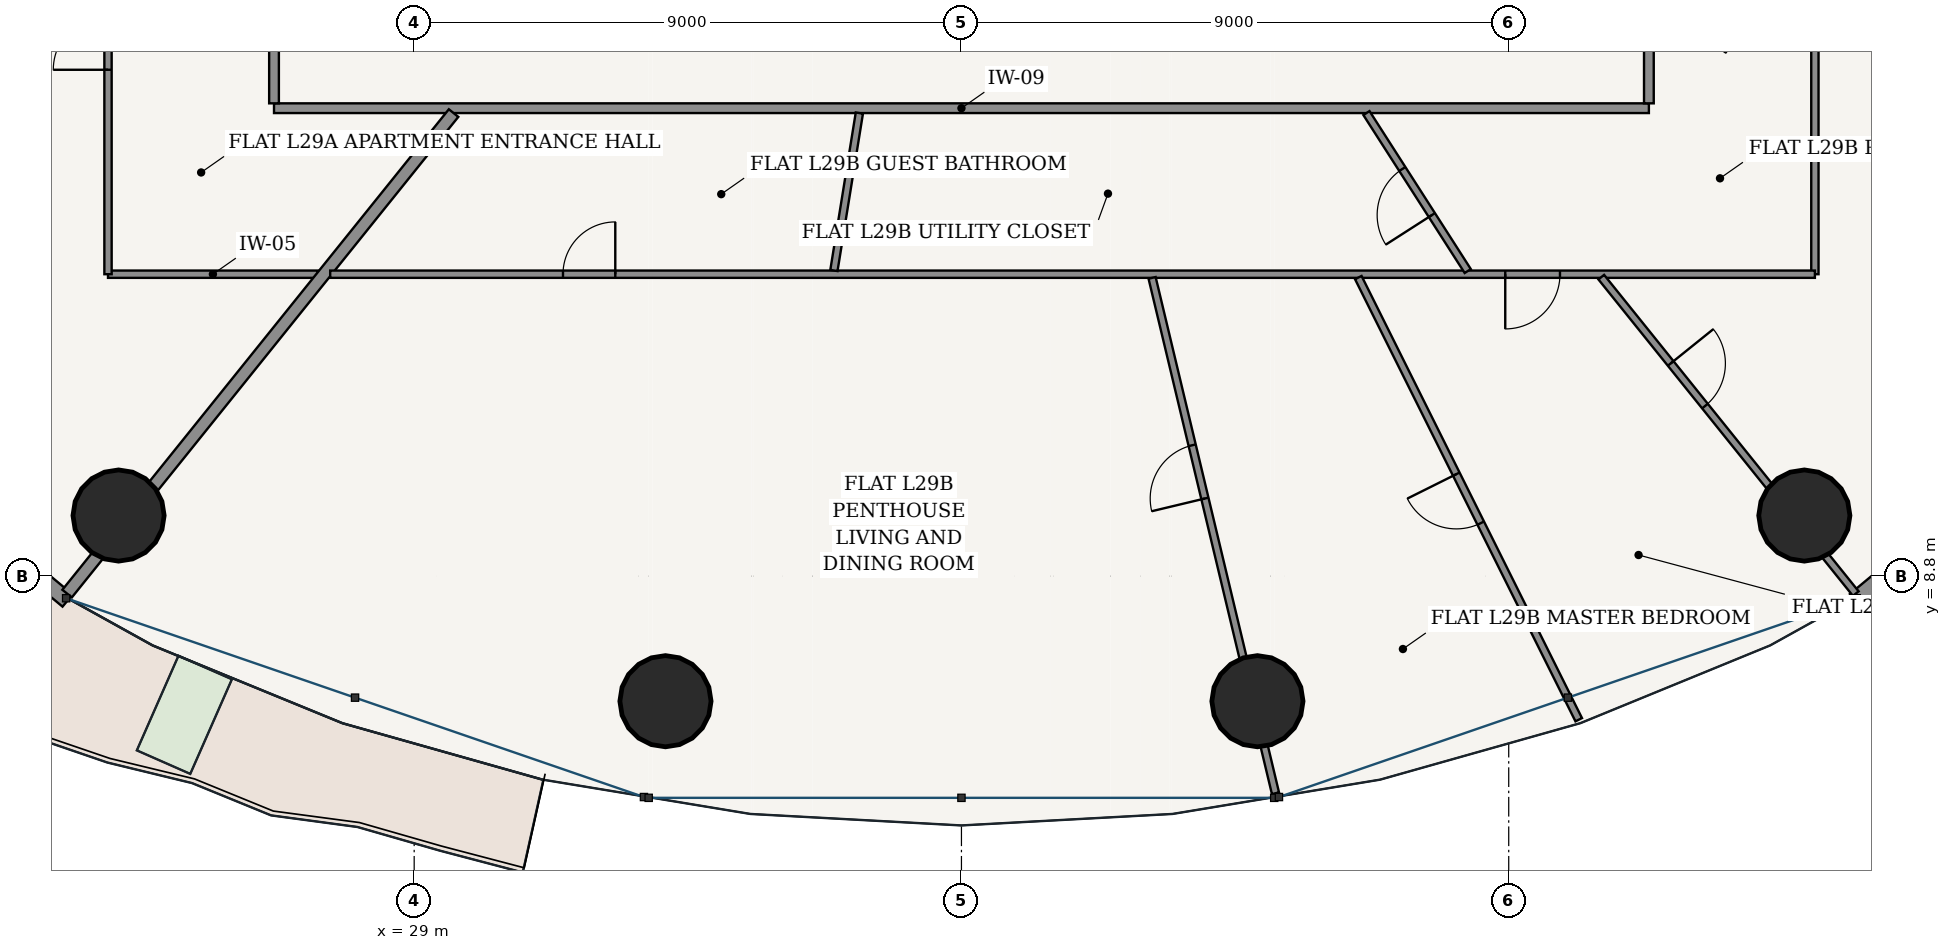
"""IFC4 building model, lengths in metres.
Left out: names, types, materials, properties, quantities, classifications, styles, units other than length and angle.
Written with IfcOpenShell. Run it as: python <this file> out.ifc"""

import sys

from ifc_helpers import new_model, si_unit, direction, frame, frame_2d, origin, origin_2d, place, context, subcontext, project, spatial, rectangle, hollow_circle, extrude, source, transform, mapped, element, fill, save


model = new_model("IFC4")
c1 = context("Model", 3, precision=1e-05, world=origin(), true_north=direction((-0.2419218956, 0.970295726276)))
c2 = subcontext(c1, "Body", "Model", "MODEL_VIEW")
j1 = project(units=[si_unit("LENGTHUNIT", "METRE"), si_unit("PLANEANGLEUNIT", "RADIAN")], contexts=[c1])
p1 = place(None, origin())
s1 = spatial("IfcSite", under=j1, at=p1, CompositionType="ELEMENT")
p2 = place(p1, origin())
s2 = spatial("IfcBuilding", under=s1, at=p2, CompositionType="ELEMENT")
p3 = place(p2, frame((0.0, 0.0, 112.2)))
s3 = spatial("IfcBuildingStorey", under=s2, at=p3, CompositionType="ELEMENT", Elevation=112.2)
for number, where, z_axis, x_axis in (
    (1, (24.138, 9.796, 0.0), (0.0, 0.0, 1.0), (1.0, 0.0, 0.0)),
    (2, (33.133, 6.743, 0.0), (0.0, 0.0, 1.0), (1.0, 0.0, 0.0)),
    (3, (42.867, 6.743, 0.0), (0.0, 0.0, 1.0), (1.0, 0.0, 0.0)),
    (4, (51.862, 9.796, 0.0), (0.0, 0.0, 1.0), (1.0, 0.0, 0.0)),
):
    element("IfcColumn", number, at=place(p3, frame(where, z_axis=z_axis, x_axis=x_axis)), inside=s3, PredefinedType="COLUMN", context=c2, shape_type="SweptSolid", body=[
        extrude(hollow_circle(Radius=0.75, WallThickness=0.045, at=origin_2d()), origin(), (0.0, 0.0, 1.0), 3.6),
    ])
p4 = place(p3, frame((15.846, 14.59, 0.0), z_axis=(0.0, 0.0, 1.0), x_axis=(0.769254958887, -0.638941944333, 0.0)))
e5 = element("IfcWall", 5, at=p4, inside=s3, PredefinedType="SOLIDWALL", context=c2, shape_type="SweptSolid", body=[
    extrude(rectangle(XDim=9.69, YDim=0.26, at=frame_2d((4.845, 0.0))), origin(), (0.0, 0.0, 1.0), 3.325),
])
p5 = place(p4, frame((4.17, 0.0, 0.0)))
e6 = element("IfcOpeningElement", 6, at=p5, cuts=e5, PredefinedType="OPENING", context=c2, shape_type="SweptSolid", body=[
    extrude(rectangle(XDim=1.35, YDim=2.2, at=frame_2d((0.675, 1.1))), frame((0.0, 0.14, 0.0), z_axis=(0.0, -1.0, 0.0), x_axis=(1.0, 0.0, 0.0)), (0.0, 0.0, 1.0), 0.28),
])
p6 = place(p3, frame((52.7, 8.398, 0.0), z_axis=(0.0, 0.0, 1.0), x_axis=(0.769254958887, 0.638941944333, 0.0)))
e7 = element("IfcWall", 7, at=p6, inside=s3, PredefinedType="SOLIDWALL", context=c2, shape_type="SweptSolid", body=[
    extrude(rectangle(XDim=9.69, YDim=0.28, at=frame_2d((4.845, 0.0))), origin(), (0.0, 0.0, 1.0), 3.325),
])
p7 = place(p6, frame((1.566, 0.0, 0.85)))
e8 = element("IfcOpeningElement", 8, at=p7, cuts=e7, PredefinedType="OPENING", context=c2, shape_type="SweptSolid", body=[
    extrude(rectangle(XDim=2.1, YDim=1.95, at=frame_2d((1.05, 0.975))), frame((0.0, 0.15, 0.0), z_axis=(0.0, -1.0, 0.0), x_axis=(1.0, 0.0, 0.0)), (0.0, 0.0, 1.0), 0.3),
])
p8 = place(p6, frame((6.023, 0.0, 0.85)))
e9 = element("IfcOpeningElement", 9, at=p8, cuts=e7, PredefinedType="OPENING", context=c2, shape_type="SweptSolid", body=[
    extrude(rectangle(XDim=2.1, YDim=1.95, at=frame_2d((1.05, 0.975))), frame((0.0, 0.15, 0.0), z_axis=(0.0, -1.0, 0.0), x_axis=(1.0, 0.0, 0.0)), (0.0, 0.0, 1.0), 0.3),
])
p9 = place(p3, frame((26.695, 16.495, 0.0), z_axis=(0.0, 0.0, 1.0), x_axis=(1.0, 0.0, 0.0)))
e10 = element("IfcWall", 10, at=p9, inside=s3, PredefinedType="PARTITIONING", context=c2, shape_type="SweptSolid", body=[
    extrude(rectangle(XDim=22.61, YDim=0.16, at=frame_2d((11.305, 0.0))), origin(), (0.0, 0.0, 1.0), 2.767),
])
p10 = place(p3, frame((26.695, 16.575, 0.0), z_axis=(0.0, 0.0, 1.0), x_axis=(0.0, 1.0, 0.0)))
e11 = element("IfcWall", 11, at=p10, inside=s3, PredefinedType="PARTITIONING", context=c2, shape_type="SweptSolid", body=[
    extrude(rectangle(XDim=20.45, YDim=0.16, at=frame_2d((10.225, 0.0))), origin(), (0.0, 0.0, 1.0), 2.767),
])
p11 = place(p10, frame((2.424, 0.0, 0.0)))
e12 = element("IfcOpeningElement", 12, at=p11, cuts=e11, PredefinedType="OPENING", context=c2, shape_type="SweptSolid", body=[
    extrude(rectangle(XDim=0.98, YDim=2.2, at=frame_2d((0.49, 1.1))), frame((0.0, 0.09, 0.0), z_axis=(0.0, -1.0, 0.0), x_axis=(1.0, 0.0, 0.0)), (0.0, 0.0, 1.0), 0.18),
])
p12 = place(p3, frame((49.305, 16.575, 0.0), z_axis=(0.0, 0.0, 1.0), x_axis=(0.0, 1.0, 0.0)))
e13 = element("IfcWall", 13, at=p12, inside=s3, PredefinedType="PARTITIONING", context=c2, shape_type="SweptSolid", body=[
    extrude(rectangle(XDim=20.45, YDim=0.16, at=frame_2d((10.225, 0.0))), origin(), (0.0, 0.0, 1.0), 2.767),
])
p13 = place(p12, frame((17.046, 0.0, 0.0)))
e14 = element("IfcOpeningElement", 14, at=p13, cuts=e13, PredefinedType="OPENING", context=c2, shape_type="SweptSolid", body=[
    extrude(rectangle(XDim=0.98, YDim=2.2, at=frame_2d((0.49, 1.1))), frame((0.0, 0.09, 0.0), z_axis=(0.0, -1.0, 0.0), x_axis=(1.0, 0.0, 0.0)), (0.0, 0.0, 1.0), 0.18),
])
p14 = place(p3, frame((27.415, 13.765, 0.0), z_axis=(0.0, 0.0, 1.0), x_axis=(-1.0, 0.0, 0.0)))
e15 = element("IfcWall", 15, at=p14, inside=s3, PredefinedType="PARTITIONING", context=c2, shape_type="SweptSolid", body=[
    extrude(rectangle(XDim=3.45, YDim=0.12, at=frame_2d((1.725, 0.0))), origin(), (0.0, 0.0, 1.0), 2.767),
])
p15 = place(p3, frame((23.965, 13.765, 0.0), z_axis=(0.0, 0.0, 1.0), x_axis=(0.0, 1.0, 0.0)))
e16 = element("IfcWall", 16, at=p15, inside=s3, PredefinedType="PARTITIONING", context=c2, shape_type="SweptSolid", body=[
    extrude(rectangle(XDim=26.07, YDim=0.12, at=frame_2d((13.035, 0.0))), origin(), (0.0, 0.0, 1.0), 2.767),
])
p16 = place(p15, frame((3.362, 0.0, 0.0)))
e17 = element("IfcOpeningElement", 17, at=p16, cuts=e16, PredefinedType="OPENING", context=c2, shape_type="SweptSolid", body=[
    extrude(rectangle(XDim=0.9, YDim=2.15, at=frame_2d((0.45, 1.075))), frame((0.0, 0.07, 0.0), z_axis=(0.0, -1.0, 0.0), x_axis=(1.0, 0.0, 0.0)), (0.0, 0.0, 1.0), 0.14),
])
p17 = place(p15, frame((13.924, 0.0, 0.0)))
e18 = element("IfcOpeningElement", 18, at=p17, cuts=e16, PredefinedType="OPENING", context=c2, shape_type="SweptSolid", body=[
    extrude(rectangle(XDim=0.9, YDim=2.15, at=frame_2d((0.45, 1.075))), frame((0.0, 0.07, 0.0), z_axis=(0.0, -1.0, 0.0), x_axis=(1.0, 0.0, 0.0)), (0.0, 0.0, 1.0), 0.14),
])
p18 = place(p3, frame((29.648, 16.415, 0.0), z_axis=(0.0, 0.0, 1.0), x_axis=(-0.626701127389, -0.779259710834, 0.0)))
e19 = element("IfcWall", 19, at=p18, inside=s3, PredefinedType="PARTITIONING", context=c2, shape_type="SweptSolid", body=[
    extrude(rectangle(XDim=10.141, YDim=0.2, at=frame_2d((5.071, 0.0))), origin(), (0.0, 0.0, 1.0), 2.767),
])
p19 = place(p3, frame((52.035, 39.835, 0.0), z_axis=(0.0, 0.0, 1.0), x_axis=(0.0, -1.0, 0.0)))
e20 = element("IfcWall", 20, at=p19, inside=s3, PredefinedType="PARTITIONING", context=c2, shape_type="SweptSolid", body=[
    extrude(rectangle(XDim=26.07, YDim=0.12, at=frame_2d((13.035, 0.0))), origin(), (0.0, 0.0, 1.0), 2.767),
])
p20 = place(p19, frame((3.362, 0.0, 0.0)))
e21 = element("IfcOpeningElement", 21, at=p20, cuts=e20, PredefinedType="OPENING", context=c2, shape_type="SweptSolid", body=[
    extrude(rectangle(XDim=0.9, YDim=2.15, at=frame_2d((0.45, 1.075))), frame((0.0, 0.07, 0.0), z_axis=(0.0, -1.0, 0.0), x_axis=(1.0, 0.0, 0.0)), (0.0, 0.0, 1.0), 0.14),
])
p21 = place(p19, frame((13.924, 0.0, 0.0)))
e22 = element("IfcOpeningElement", 22, at=p21, cuts=e20, PredefinedType="OPENING", context=c2, shape_type="SweptSolid", body=[
    extrude(rectangle(XDim=0.9, YDim=2.15, at=frame_2d((0.45, 1.075))), frame((0.0, 0.07, 0.0), z_axis=(0.0, -1.0, 0.0), x_axis=(1.0, 0.0, 0.0)), (0.0, 0.0, 1.0), 0.14),
])
p22 = place(p3, frame((52.035, 13.765, 0.0), z_axis=(0.0, 0.0, 1.0), x_axis=(-1.0, 0.0, 0.0)))
e23 = element("IfcWall", 23, at=p22, inside=s3, PredefinedType="PARTITIONING", context=c2, shape_type="SweptSolid", body=[
    extrude(rectangle(XDim=24.416, YDim=0.12, at=frame_2d((12.208, 0.0))), origin(), (0.0, 0.0, 1.0), 2.767),
])
p23 = place(p22, frame((4.192, 0.0, 0.0)))
e24 = element("IfcOpeningElement", 24, at=p23, cuts=e23, PredefinedType="OPENING", context=c2, shape_type="SweptSolid", body=[
    extrude(rectangle(XDim=0.9, YDim=2.15, at=frame_2d((0.45, 1.075))), frame((0.0, 0.07, 0.0), z_axis=(0.0, -1.0, 0.0), x_axis=(1.0, 0.0, 0.0)), (0.0, 0.0, 1.0), 0.14),
])
p24 = place(p22, frame((19.728, 0.0, 0.0)))
e25 = element("IfcOpeningElement", 25, at=p24, cuts=e23, PredefinedType="OPENING", context=c2, shape_type="SweptSolid", body=[
    extrude(rectangle(XDim=0.86, YDim=2.15, at=frame_2d((0.43, 1.075))), frame((0.0, 0.07, 0.0), z_axis=(0.0, -1.0, 0.0), x_axis=(1.0, 0.0, 0.0)), (0.0, 0.0, 1.0), 0.14),
])
p25 = place(p3, frame((41.135, 13.705, 0.0), z_axis=(0.0, 0.0, 1.0), x_axis=(0.23282725047, -0.97251810854, 0.0)))
e26 = element("IfcWall", 26, at=p25, inside=s3, PredefinedType="PARTITIONING", context=c2, shape_type="SweptSolid", body=[
    extrude(rectangle(XDim=8.715, YDim=0.12, at=frame_2d((4.357, 0.0))), origin(), (0.0, 0.0, 1.0), 2.767),
])
p26 = place(p25, frame((2.831, 0.0, 0.0)))
e27 = element("IfcOpeningElement", 27, at=p26, cuts=e26, PredefinedType="OPENING", context=c2, shape_type="SweptSolid", body=[
    extrude(rectangle(XDim=0.9, YDim=2.15, at=frame_2d((0.45, 1.075))), frame((0.0, 0.07, 0.0), z_axis=(0.0, -1.0, 0.0), x_axis=(1.0, 0.0, 0.0)), (0.0, 0.0, 1.0), 0.14),
])
p27 = place(p3, frame((44.526, 13.709, 0.0), z_axis=(0.0, 0.0, 1.0), x_axis=(0.446179583353, -0.894943450392, 0.0)))
e28 = element("IfcWall", 28, at=p27, inside=s3, PredefinedType="PARTITIONING", context=c2, shape_type="SweptSolid", body=[
    extrude(rectangle(XDim=8.125, YDim=0.12, at=frame_2d((4.062, 0.0))), origin(), (0.0, 0.0, 1.0), 2.767),
])
p28 = place(p27, frame((3.612, 0.0, 0.0)))
e29 = element("IfcOpeningElement", 29, at=p28, cuts=e28, PredefinedType="OPENING", context=c2, shape_type="SweptSolid", body=[
    extrude(rectangle(XDim=0.9, YDim=2.15, at=frame_2d((0.45, 1.075))), frame((0.0, 0.07, 0.0), z_axis=(0.0, -1.0, 0.0), x_axis=(1.0, 0.0, 0.0)), (0.0, 0.0, 1.0), 0.14),
])
p29 = place(p3, frame((48.522, 13.717, 0.0), z_axis=(0.0, 0.0, 1.0), x_axis=(0.626707979732, -0.77925419995, 0.0)))
e30 = element("IfcWall", 30, at=p29, inside=s3, PredefinedType="PARTITIONING", context=c2, shape_type="SweptSolid", body=[
    extrude(rectangle(XDim=6.679, YDim=0.12, at=frame_2d((3.339, 0.0))), origin(), (0.0, 0.0, 1.0), 2.767),
])
p30 = place(p29, frame((1.821, 0.0, 0.0)))
e31 = element("IfcOpeningElement", 31, at=p30, cuts=e30, PredefinedType="OPENING", context=c2, shape_type="SweptSolid", body=[
    extrude(rectangle(XDim=0.9, YDim=2.15, at=frame_2d((0.45, 1.075))), frame((0.0, 0.07, 0.0), z_axis=(0.0, -1.0, 0.0), x_axis=(1.0, 0.0, 0.0)), (0.0, 0.0, 1.0), 0.14),
])
p31 = place(p3, frame((52.089, 18.979, 0.0), z_axis=(0.0, 0.0, 1.0), x_axis=(0.874313476423, -0.485361664066, 0.0)))
e32 = element("IfcWall", 32, at=p31, inside=s3, PredefinedType="PARTITIONING", context=c2, shape_type="SweptSolid", body=[
    extrude(rectangle(XDim=9.066, YDim=0.12, at=frame_2d((4.533, 0.0))), origin(), (0.0, 0.0, 1.0), 2.767),
])
p32 = place(p3, frame((36.321, 16.415, 0.0), z_axis=(0.0, 0.0, 1.0), x_axis=(-0.159566101486, -0.9871872463, 0.0)))
e33 = element("IfcWall", 33, at=p32, inside=s3, PredefinedType="PARTITIONING", context=c2, shape_type="SweptSolid", body=[
    extrude(rectangle(XDim=2.623, YDim=0.12, at=frame_2d((1.311, 0.0))), origin(), (0.0, 0.0, 1.0), 3.325),
])
p33 = place(p3, frame((44.66, 16.415, 0.0), z_axis=(0.0, 0.0, 1.0), x_axis=(0.539825682796, -0.841776830397, 0.0)))
e34 = element("IfcWall", 34, at=p33, inside=s3, PredefinedType="PARTITIONING", context=c2, shape_type="SweptSolid", body=[
    extrude(rectangle(XDim=3.086, YDim=0.12, at=frame_2d((1.543, 0.0))), origin(), (0.0, 0.0, 1.0), 3.325),
])
p34 = place(p33, frame((1.093, 0.0, 0.0)))
e35 = element("IfcOpeningElement", 35, at=p34, cuts=e34, PredefinedType="OPENING", context=c2, shape_type="SweptSolid", body=[
    extrude(rectangle(XDim=0.9, YDim=2.15, at=frame_2d((0.45, 1.075))), frame((0.0, 0.07, 0.0), z_axis=(0.0, -1.0, 0.0), x_axis=(1.0, 0.0, 0.0)), (0.0, 0.0, 1.0), 0.14),
])
m1 = source(origin(), c2, "Body", "SweptSolid", [
    extrude(rectangle(XDim=0.9, YDim=2.15, at=frame_2d((0.45, 1.075))), frame((0.0, 0.025, 0.0), z_axis=(0.0, -1.0, 0.0), x_axis=(1.0, 0.0, 0.0)), (0.0, 0.0, 1.0), 0.05),
])
p35 = place(p16, origin())
e36 = element("IfcDoor", 36, at=p35, inside=s3, OperationType="SINGLE_SWING_LEFT", PredefinedType="DOOR", context=c2, shape_type="MappedRepresentation", body=[
    mapped(m1, transform((0.0, 0.0, 0.0), scale=1.0)),
])
fill(e17, e36)
p36 = place(p23, origin())
e37 = element("IfcDoor", 37, at=p36, inside=s3, OperationType="SINGLE_SWING_RIGHT", PredefinedType="DOOR", context=c2, shape_type="MappedRepresentation", body=[
    mapped(m1, transform((0.0, 0.0, 0.0), scale=1.0)),
])
fill(e24, e37)
p37 = place(p30, origin())
e38 = element("IfcDoor", 38, at=p37, inside=s3, OperationType="SINGLE_SWING_LEFT", PredefinedType="DOOR", context=c2, shape_type="MappedRepresentation", body=[
    mapped(m1, transform((0.0, 0.0, 0.0), scale=1.0)),
])
fill(e31, e38)
p38 = place(p34, frame((0.9, 0.0, 0.0), z_axis=(0.0, 0.0, 1.0), x_axis=(-1.0, 0.0, 0.0)))
e39 = element("IfcDoor", 39, at=p38, inside=s3, OperationType="SINGLE_SWING_LEFT", PredefinedType="DOOR", context=c2, shape_type="MappedRepresentation", body=[
    mapped(m1, transform((0.0, 0.0, 0.0), scale=1.0)),
])
fill(e35, e39)
p39 = place(p28, frame((0.9, 0.0, 0.0), z_axis=(0.0, 0.0, 1.0), x_axis=(-1.0, 0.0, 0.0)))
e40 = element("IfcDoor", 40, at=p39, inside=s3, OperationType="SINGLE_SWING_RIGHT", PredefinedType="DOOR", context=c2, shape_type="MappedRepresentation", body=[
    mapped(m1, transform((0.0, 0.0, 0.0), scale=1.0)),
])
fill(e29, e40)
p40 = place(p26, frame((0.9, 0.0, 0.0), z_axis=(0.0, 0.0, 1.0), x_axis=(-1.0, 0.0, 0.0)))
e41 = element("IfcDoor", 41, at=p40, inside=s3, OperationType="SINGLE_SWING_LEFT", PredefinedType="DOOR", context=c2, shape_type="MappedRepresentation", body=[
    mapped(m1, transform((0.0, 0.0, 0.0), scale=1.0)),
])
fill(e27, e41)
m2 = source(origin(), c2, "Body", "SweptSolid", [
    extrude(rectangle(XDim=0.86, YDim=2.15, at=frame_2d((0.43, 1.075))), frame((0.0, 0.025, 0.0), z_axis=(0.0, -1.0, 0.0), x_axis=(1.0, 0.0, 0.0)), (0.0, 0.0, 1.0), 0.05),
])
p41 = place(p24, frame((0.86, 0.0, 0.0), z_axis=(0.0, 0.0, 1.0), x_axis=(-1.0, 0.0, 0.0)))
e42 = element("IfcDoor", 42, at=p41, inside=s3, OperationType="SINGLE_SWING_RIGHT", PredefinedType="DOOR", context=c2, shape_type="MappedRepresentation", body=[
    mapped(m2, transform((0.0, 0.0, 0.0), scale=1.0)),
])
fill(e25, e42)
save(model, sys.argv[1])
